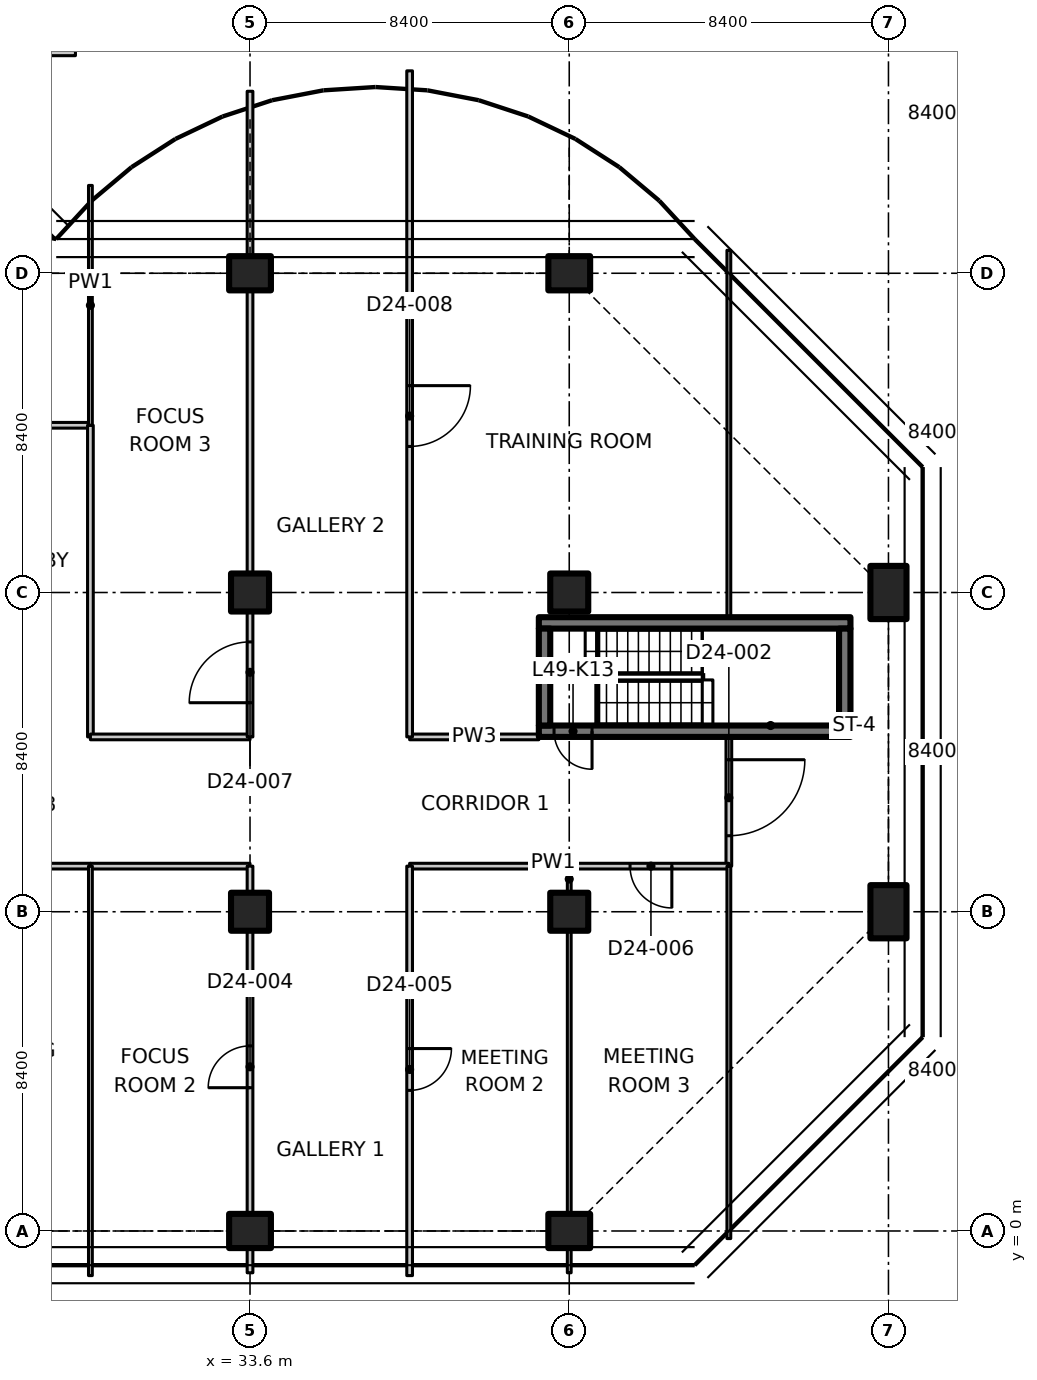
"""IFC4 building model, lengths in metres.
Left out: names, types, materials, properties, quantities, classifications, styles, units other than length and angle.
Written with IfcOpenShell. Run it as: python <this file> out.ifc"""

import sys

from ifc_helpers import new_model, si_unit, direction, frame, frame_2d, origin, origin_2d, place, context, subcontext, project, spatial, polyline, rectangle, outline, extrude, element, fill, save


model = new_model("IFC4")
c1 = context("Model", 3, precision=1e-05, world=origin(), true_north=direction((0.0, 1.0)))
c2 = subcontext(c1, "Body", "Model", "MODEL_VIEW")
j1 = project(units=[si_unit("LENGTHUNIT", "METRE"), si_unit("PLANEANGLEUNIT", "RADIAN")], contexts=[c1])
p1 = place(None, origin())
s1 = spatial("IfcSite", under=j1, at=p1, CompositionType="ELEMENT")
p2 = place(p1, origin())
s2 = spatial("IfcBuilding", under=s1, at=p2, CompositionType="ELEMENT")
p3 = place(p2, frame((0.0, 0.0, 195.6)))
s3 = spatial("IfcBuildingStorey", under=s2, at=p3, CompositionType="ELEMENT", Elevation=195.6)
p4 = place(p3, frame((33.6, 0.0, 0.0), z_axis=(0.0, 0.0, 1.0), x_axis=(0.0, 1.0, 0.0)))
e1 = element("IfcColumn", 1, at=p4, inside=s3, PredefinedType="COLUMN", context=c2, shape_type="SweptSolid", body=[
    extrude(rectangle(XDim=0.9, YDim=1.1, at=origin_2d()), origin(), (0.0, 0.0, 1.0), 3.35),
])
for number, where, z_axis, x_axis in (
    (2, (33.6, 8.4, 0.0), (0.0, 0.0, 1.0), (1.0, 0.0, 0.0)),
    (3, (33.6, 16.8, 0.0), (0.0, 0.0, 1.0), (1.0, 0.0, 0.0)),
):
    element("IfcColumn", number, at=place(p3, frame(where, z_axis=z_axis, x_axis=x_axis)), inside=s3, PredefinedType="COLUMN", context=c2, shape_type="SweptSolid", body=[
        extrude(rectangle(XDim=1.0, YDim=1.0, at=origin_2d()), origin(), (0.0, 0.0, 1.0), 3.35),
    ])
for number, where, z_axis, x_axis in (
    (4, (33.6, 25.2, 0.0), (0.0, 0.0, 1.0), (0.0, 1.0, 0.0)),
    (5, (42.0, 0.0, 0.0), (0.0, 0.0, 1.0), (0.0, 1.0, 0.0)),
):
    element("IfcColumn", number, at=place(p3, frame(where, z_axis=z_axis, x_axis=x_axis)), inside=s3, PredefinedType="COLUMN", context=c2, shape_type="SweptSolid", body=[
        extrude(rectangle(XDim=0.9, YDim=1.1, at=origin_2d()), origin(), (0.0, 0.0, 1.0), 3.35),
    ])
for number, where, z_axis, x_axis in (
    (6, (42.0, 8.4, 0.0), (0.0, 0.0, 1.0), (1.0, 0.0, 0.0)),
    (7, (42.0, 16.8, 0.0), (0.0, 0.0, 1.0), (1.0, 0.0, 0.0)),
):
    element("IfcColumn", number, at=place(p3, frame(where, z_axis=z_axis, x_axis=x_axis)), inside=s3, PredefinedType="COLUMN", context=c2, shape_type="SweptSolid", body=[
        extrude(rectangle(XDim=1.0, YDim=1.0, at=origin_2d()), origin(), (0.0, 0.0, 1.0), 3.35),
    ])
p5 = place(p3, frame((42.0, 25.2, 0.0), z_axis=(0.0, 0.0, 1.0), x_axis=(0.0, 1.0, 0.0)))
e8 = element("IfcColumn", 8, at=p5, inside=s3, PredefinedType="COLUMN", context=c2, shape_type="SweptSolid", body=[
    extrude(rectangle(XDim=0.9, YDim=1.1, at=origin_2d()), origin(), (0.0, 0.0, 1.0), 3.35),
])
for number, where, z_axis, x_axis in (
    (9, (50.4, 8.4, 0.0), (0.0, 0.0, 1.0), (1.0, 0.0, 0.0)),
    (10, (50.4, 16.8, 0.0), (0.0, 0.0, 1.0), (1.0, 0.0, 0.0)),
):
    element("IfcColumn", number, at=place(p3, frame(where, z_axis=z_axis, x_axis=x_axis)), inside=s3, PredefinedType="COLUMN", context=c2, shape_type="SweptSolid", body=[
        extrude(rectangle(XDim=0.95, YDim=1.4, at=origin_2d()), origin(), (0.0, 0.0, 1.0), 3.35),
    ])
p6 = place(p3, frame((49.4, 13.15, 0.0), z_axis=(0.0, 0.0, 1.0), x_axis=(-1.0, 0.0, 0.0)))
e11 = element("IfcWall", 11, at=p6, inside=s3, PredefinedType="SHEAR", context=c2, shape_type="SweptSolid", body=[
    extrude(rectangle(XDim=8.2, YDim=0.3, at=frame_2d((4.1, 0.0))), origin(), (0.0, 0.0, 1.0), 3.35),
])
p7 = place(p6, frame((6.8, 0.0, 0.0)))
e12 = element("IfcOpeningElement", 12, at=p7, cuts=e11, PredefinedType="OPENING", context=c2, shape_type="SweptSolid", body=[
    extrude(rectangle(XDim=1.0, YDim=2.1, at=frame_2d((0.5, 1.05))), frame((0.0, 0.16, 0.0), z_axis=(0.0, -1.0, 0.0), x_axis=(1.0, 0.0, 0.0)), (0.0, 0.0, 1.0), 0.32),
])
p8 = place(p3, frame((41.2, 16.0, 0.0), z_axis=(0.0, 0.0, 1.0), x_axis=(1.0, 0.0, 0.0)))
e13 = element("IfcWall", 13, at=p8, inside=s3, PredefinedType="SHEAR", context=c2, shape_type="SweptSolid", body=[
    extrude(rectangle(XDim=8.2, YDim=0.3, at=frame_2d((4.1, 0.0))), origin(), (0.0, 0.0, 1.0), 3.35),
])
for number, where, z_axis, x_axis in (
    (14, (41.35, 13.3, 0.0), (0.0, 0.0, 1.0), (0.0, 1.0, 0.0)),
    (15, (49.25, 13.3, 0.0), (0.0, 0.0, 1.0), (0.0, 1.0, 0.0)),
):
    element("IfcWall", number, at=place(p3, frame(where, z_axis=z_axis, x_axis=x_axis)), inside=s3, PredefinedType="SHEAR", context=c2, shape_type="SweptSolid", body=[
        extrude(rectangle(XDim=2.55, YDim=0.3, at=frame_2d((1.275, 0.0))), origin(), (0.0, 0.0, 1.0), 3.35),
    ])
p9 = place(p3, frame((25.2, 21.2, 0.0), z_axis=(0.0, 0.0, 1.0), x_axis=(1.0, 0.0, 0.0)))
e16 = element("IfcWall", 16, at=p9, inside=s3, PredefinedType="PARTITIONING", context=c2, shape_type="SweptSolid", body=[
    extrude(rectangle(XDim=4.2, YDim=0.15, at=frame_2d((2.1, 0.0))), origin(), (0.0, 0.0, 1.0), 3.33),
])
p10 = place(p3, frame((29.4, 9.6, 0.0), z_axis=(0.0, 0.0, 1.0), x_axis=(-1.0, 0.0, 0.0)))
e17 = element("IfcWall", 17, at=p10, inside=s3, PredefinedType="PARTITIONING", context=c2, shape_type="SweptSolid", body=[
    extrude(rectangle(XDim=4.2, YDim=0.15, at=frame_2d((2.1, 0.0))), origin(), (0.0, 0.0, 1.0), 3.33),
])
p11 = place(p10, frame((1.5, 0.0, 0.0)))
e18 = element("IfcOpeningElement", 18, at=p11, cuts=e17, PredefinedType="OPENING", context=c2, shape_type="SweptSolid", body=[
    extrude(rectangle(XDim=1.1, YDim=2.1, at=frame_2d((0.55, 1.05))), frame((0.0, 0.085, 0.0), z_axis=(0.0, -1.0, 0.0), x_axis=(1.0, 0.0, 0.0)), (0.0, 0.0, 1.0), 0.17),
])
p12 = place(p3, frame((29.4, 21.2, 0.0), z_axis=(0.0, 0.0, 1.0), x_axis=(0.0, -1.0, 0.0)))
e19 = element("IfcWall", 19, at=p12, inside=s3, PredefinedType="PARTITIONING", context=c2, shape_type="SweptSolid", body=[
    extrude(rectangle(XDim=8.2, YDim=0.15, at=frame_2d((4.1, 0.0))), origin(), (0.0, 0.0, 1.0), 3.33),
])
p13 = place(p3, frame((29.4, 27.511, 0.0), z_axis=(0.0, 0.0, 1.0), x_axis=(0.0, -1.0, 0.0)))
e20 = element("IfcWall", 20, at=p13, inside=s3, PredefinedType="PARTITIONING", context=c2, shape_type="SweptSolid", body=[
    extrude(outline(polyline([(0.0, 0.0), (6.311, 0.0), (6.311, 3.33), (2.761, 3.33), (2.759, 2.98), (1.863, 2.98), (1.861, 3.33), (0.236, 3.33), (0.0, 3.33), (0.0, 0.0)])), frame((0.0, 0.05, 0.0), z_axis=(0.0, -1.0, 0.0), x_axis=(1.0, 0.0, 0.0)), (0.0, 0.0, 1.0), 0.1),
])
p14 = place(p3, frame((25.2, 31.0, 0.0), z_axis=(0.0, 0.0, 1.0), x_axis=(1.0, 0.0, 0.0)))
e21 = element("IfcWall", 21, at=p14, inside=s3, PredefinedType="PARTITIONING", context=c2, shape_type="SweptSolid", body=[
    extrude(rectangle(XDim=3.806, YDim=0.15, at=frame_2d((1.903, 0.0))), origin(), (0.0, 0.0, 1.0), 2.98),
])
p15 = place(p3, frame((46.2, 13.0, 0.0), z_axis=(0.0, 0.0, 1.0), x_axis=(0.0, -1.0, 0.0)))
e22 = element("IfcWall", 22, at=p15, inside=s3, PredefinedType="PARTITIONING", context=c2, shape_type="SweptSolid", body=[
    extrude(rectangle(XDim=3.4, YDim=0.15, at=frame_2d((1.7, 0.0))), origin(), (0.0, 0.0, 1.0), 3.33),
])
p16 = place(p15, frame((0.6, 0.0, 0.0)))
e23 = element("IfcOpeningElement", 23, at=p16, cuts=e22, PredefinedType="OPENING", context=c2, shape_type="SweptSolid", body=[
    extrude(rectangle(XDim=2.0, YDim=2.4, at=frame_2d((1.0, 1.2))), frame((0.0, 0.085, 0.0), z_axis=(0.0, -1.0, 0.0), x_axis=(1.0, 0.0, 0.0)), (0.0, 0.0, 1.0), 0.17),
])
p17 = place(p3, frame((33.6, 9.6, 0.0), z_axis=(0.0, 0.0, 1.0), x_axis=(-1.0, 0.0, 0.0)))
e24 = element("IfcWall", 24, at=p17, inside=s3, PredefinedType="PARTITIONING", context=c2, shape_type="SweptSolid", body=[
    extrude(rectangle(XDim=4.2, YDim=0.15, at=frame_2d((2.1, 0.0))), origin(), (0.0, 0.0, 1.0), 3.33),
])
p18 = place(p3, frame((42.0, 9.6, 0.0), z_axis=(0.0, 0.0, 1.0), x_axis=(-1.0, 0.0, 0.0)))
e25 = element("IfcWall", 25, at=p18, inside=s3, PredefinedType="PARTITIONING", context=c2, shape_type="SweptSolid", body=[
    extrude(rectangle(XDim=4.2, YDim=0.15, at=frame_2d((2.1, 0.0))), origin(), (0.0, 0.0, 1.0), 3.33),
])
p19 = place(p3, frame((46.2, 9.6, 0.0), z_axis=(0.0, 0.0, 1.0), x_axis=(-1.0, 0.0, 0.0)))
e26 = element("IfcWall", 26, at=p19, inside=s3, PredefinedType="PARTITIONING", context=c2, shape_type="SweptSolid", body=[
    extrude(rectangle(XDim=4.2, YDim=0.15, at=frame_2d((2.1, 0.0))), origin(), (0.0, 0.0, 1.0), 3.33),
])
p20 = place(p19, frame((1.5, 0.0, 0.0)))
e27 = element("IfcOpeningElement", 27, at=p20, cuts=e26, PredefinedType="OPENING", context=c2, shape_type="SweptSolid", body=[
    extrude(rectangle(XDim=1.1, YDim=2.1, at=frame_2d((0.55, 1.05))), frame((0.0, 0.085, 0.0), z_axis=(0.0, -1.0, 0.0), x_axis=(1.0, 0.0, 0.0)), (0.0, 0.0, 1.0), 0.17),
])
p21 = place(p3, frame((29.4, 13.0, 0.0), z_axis=(0.0, 0.0, 1.0), x_axis=(1.0, 0.0, 0.0)))
e28 = element("IfcWall", 28, at=p21, inside=s3, PredefinedType="PARTITIONING", context=c2, shape_type="SweptSolid", body=[
    extrude(rectangle(XDim=4.2, YDim=0.15, at=frame_2d((2.1, 0.0))), origin(), (0.0, 0.0, 1.0), 3.33),
])
p22 = place(p3, frame((37.8, 13.0, 0.0), z_axis=(0.0, 0.0, 1.0), x_axis=(1.0, 0.0, 0.0)))
e29 = element("IfcWall", 29, at=p22, inside=s3, PredefinedType="PARTITIONING", context=c2, shape_type="SweptSolid", body=[
    extrude(rectangle(XDim=3.4, YDim=0.15, at=frame_2d((1.7, 0.0))), origin(), (0.0, 0.0, 1.0), 3.33),
])
p23 = place(p3, frame((46.2, -0.2, 0.0), z_axis=(0.0, 0.0, 1.0), x_axis=(0.0, 1.0, 0.0)))
e30 = element("IfcWall", 30, at=p23, inside=s3, PredefinedType="PARTITIONING", context=c2, shape_type="SweptSolid", body=[
    extrude(outline(polyline([(0.0, 0.0), (9.8, 0.0), (9.8, 3.33), (5.066, 3.33), (5.064, 2.98), (3.736, 2.98), (3.734, 3.33), (0.0, 3.33), (0.0, 0.0)])), frame((0.0, 0.05, 0.0), z_axis=(0.0, -1.0, 0.0), x_axis=(1.0, 0.0, 0.0)), (0.0, 0.0, 1.0), 0.1),
])
p24 = place(p3, frame((46.2, 16.15, 0.0), z_axis=(0.0, 0.0, 1.0), x_axis=(0.0, 1.0, 0.0)))
e31 = element("IfcWall", 31, at=p24, inside=s3, PredefinedType="PARTITIONING", context=c2, shape_type="SweptSolid", body=[
    extrude(outline(polyline([(0.0, 0.0), (9.656, 0.0), (9.656, 3.33), (9.25, 3.33), (5.516, 3.33), (5.514, 2.98), (4.186, 2.98), (4.184, 3.33), (0.0, 3.33), (0.0, 0.0)])), frame((0.0, 0.05, 0.0), z_axis=(0.0, -1.0, 0.0), x_axis=(1.0, 0.0, 0.0)), (0.0, 0.0, 1.0), 0.1),
])
p25 = place(p3, frame((33.6, -1.1, 0.0), z_axis=(0.0, 0.0, 1.0), x_axis=(0.0, 1.0, 0.0)))
e32 = element("IfcWall", 32, at=p25, inside=s3, PredefinedType="PARTITIONING", context=c2, shape_type="SweptSolid", body=[
    extrude(rectangle(XDim=0.63, YDim=0.15, at=frame_2d((0.315, 0.0))), origin(), (0.0, 0.0, 1.0), 3.33),
])
p26 = place(p3, frame((33.6, 0.47, 0.0), z_axis=(0.0, 0.0, 1.0), x_axis=(0.0, 1.0, 0.0)))
e33 = element("IfcWall", 33, at=p26, inside=s3, PredefinedType="PARTITIONING", context=c2, shape_type="SweptSolid", body=[
    extrude(rectangle(XDim=7.41, YDim=0.15, at=frame_2d((3.705, 0.0))), origin(), (0.0, 0.0, 1.0), 3.33),
])
p27 = place(p26, frame((3.3, 0.0, 0.0)))
e34 = element("IfcOpeningElement", 34, at=p27, cuts=e33, PredefinedType="OPENING", context=c2, shape_type="SweptSolid", body=[
    extrude(rectangle(XDim=1.1, YDim=2.1, at=frame_2d((0.55, 1.05))), frame((0.0, 0.085, 0.0), z_axis=(0.0, -1.0, 0.0), x_axis=(1.0, 0.0, 0.0)), (0.0, 0.0, 1.0), 0.17),
])
p28 = place(p3, frame((33.6, 8.92, 0.0), z_axis=(0.0, 0.0, 1.0), x_axis=(0.0, 1.0, 0.0)))
e35 = element("IfcWall", 35, at=p28, inside=s3, PredefinedType="PARTITIONING", context=c2, shape_type="SweptSolid", body=[
    extrude(rectangle(XDim=0.68, YDim=0.15, at=frame_2d((0.34, 0.0))), origin(), (0.0, 0.0, 1.0), 3.33),
])
p29 = place(p3, frame((37.8, 9.6, 0.0), z_axis=(0.0, 0.0, 1.0), x_axis=(0.0, -1.0, 0.0)))
e36 = element("IfcWall", 36, at=p29, inside=s3, PredefinedType="PARTITIONING", context=c2, shape_type="SweptSolid", body=[
    extrude(outline(polyline([(0.0, 0.0), (10.774, 0.0), (10.774, 3.33), (10.7, 3.33), (10.05, 3.33), (10.048, 2.98), (9.152, 2.98), (9.15, 3.33), (0.0, 3.33), (0.0, 0.0)])), frame((0.0, 0.075, 0.0), z_axis=(0.0, -1.0, 0.0), x_axis=(1.0, 0.0, 0.0)), (0.0, 0.0, 1.0), 0.15),
])
p30 = place(p29, frame((4.8, 0.0, 0.0)))
e37 = element("IfcOpeningElement", 37, at=p30, cuts=e36, PredefinedType="OPENING", context=c2, shape_type="SweptSolid", body=[
    extrude(rectangle(XDim=1.1, YDim=2.1, at=frame_2d((0.55, 1.05))), frame((0.0, 0.085, 0.0), z_axis=(0.0, -1.0, 0.0), x_axis=(1.0, 0.0, 0.0)), (0.0, 0.0, 1.0), 0.17),
])
p31 = place(p3, frame((29.4, 9.6, 0.0), z_axis=(0.0, 0.0, 1.0), x_axis=(0.0, -1.0, 0.0)))
e38 = element("IfcWall", 38, at=p31, inside=s3, PredefinedType="PARTITIONING", context=c2, shape_type="SweptSolid", body=[
    extrude(outline(polyline([(0.0, 0.0), (10.774, 0.0), (10.774, 3.33), (10.7, 3.33), (10.05, 3.33), (10.048, 2.98), (9.152, 2.98), (9.15, 3.33), (0.0, 3.33), (0.0, 0.0)])), frame((0.0, 0.05, 0.0), z_axis=(0.0, -1.0, 0.0), x_axis=(1.0, 0.0, 0.0)), (0.0, 0.0, 1.0), 0.1),
])
p32 = place(p3, frame((42.0, 9.6, 0.0), z_axis=(0.0, 0.0, 1.0), x_axis=(0.0, -1.0, 0.0)))
e39 = element("IfcWall", 39, at=p32, inside=s3, PredefinedType="PARTITIONING", context=c2, shape_type="SweptSolid", body=[
    extrude(rectangle(XDim=0.68, YDim=0.1, at=frame_2d((0.34, 0.0))), origin(), (0.0, 0.0, 1.0), 3.33),
])
p33 = place(p3, frame((42.0, 7.88, 0.0), z_axis=(0.0, 0.0, 1.0), x_axis=(0.0, -1.0, 0.0)))
e40 = element("IfcWall", 40, at=p33, inside=s3, PredefinedType="PARTITIONING", context=c2, shape_type="SweptSolid", body=[
    extrude(outline(polyline([(0.0, 0.0), (7.41, 0.0), (7.41, 2.98), (7.216, 2.98), (7.214, 3.33), (0.0, 3.33), (0.0, 0.0)])), frame((0.0, 0.05, 0.0), z_axis=(0.0, -1.0, 0.0), x_axis=(1.0, 0.0, 0.0)), (0.0, 0.0, 1.0), 0.1),
])
p34 = place(p3, frame((42.0, -0.47, 0.0), z_axis=(0.0, 0.0, 1.0), x_axis=(0.0, -1.0, 0.0)))
e41 = element("IfcWall", 41, at=p34, inside=s3, PredefinedType="PARTITIONING", context=c2, shape_type="SweptSolid", body=[
    extrude(rectangle(XDim=0.63, YDim=0.1, at=frame_2d((0.315, 0.0))), origin(), (0.0, 0.0, 1.0), 3.33),
])
p35 = place(p3, frame((33.6, 13.0, 0.0), z_axis=(0.0, 0.0, 1.0), x_axis=(0.0, 1.0, 0.0)))
e42 = element("IfcWall", 42, at=p35, inside=s3, PredefinedType="PARTITIONING", context=c2, shape_type="SweptSolid", body=[
    extrude(rectangle(XDim=3.28, YDim=0.15, at=frame_2d((1.64, 0.0))), origin(), (0.0, 0.0, 1.0), 3.33),
])
p36 = place(p35, frame((0.9, 0.0, 0.0)))
e43 = element("IfcOpeningElement", 43, at=p36, cuts=e42, PredefinedType="OPENING", context=c2, shape_type="SweptSolid", body=[
    extrude(rectangle(XDim=1.6, YDim=2.1, at=frame_2d((0.8, 1.05))), frame((0.0, 0.085, 0.0), z_axis=(0.0, -1.0, 0.0), x_axis=(1.0, 0.0, 0.0)), (0.0, 0.0, 1.0), 0.17),
])
p37 = place(p3, frame((33.6, 17.32, 0.0), z_axis=(0.0, 0.0, 1.0), x_axis=(0.0, 1.0, 0.0)))
e44 = element("IfcWall", 44, at=p37, inside=s3, PredefinedType="PARTITIONING", context=c2, shape_type="SweptSolid", body=[
    extrude(rectangle(XDim=7.41, YDim=0.15, at=frame_2d((3.705, 0.0))), origin(), (0.0, 0.0, 1.0), 3.33),
])
p38 = place(p3, frame((33.6, 25.67, 0.0), z_axis=(0.0, 0.0, 1.0), x_axis=(0.0, 1.0, 0.0)))
e45 = element("IfcWall", 45, at=p38, inside=s3, PredefinedType="PARTITIONING", context=c2, shape_type="SweptSolid", body=[
    extrude(rectangle(XDim=4.318, YDim=0.15, at=frame_2d((2.159, 0.0))), origin(), (0.0, 0.0, 1.0), 2.98),
])
p39 = place(p3, frame((37.8, 30.526, 0.0), z_axis=(0.0, 0.0, 1.0), x_axis=(0.0, -1.0, 0.0)))
e46 = element("IfcWall", 46, at=p39, inside=s3, PredefinedType="PARTITIONING", context=c2, shape_type="SweptSolid", body=[
    extrude(outline(polyline([(0.0, 0.0), (17.526, 0.0), (17.526, 3.33), (5.776, 3.33), (5.774, 2.98), (4.878, 2.98), (4.876, 3.33), (0.283, 3.33), (0.0, 3.33), (0.0, 0.0)])), frame((0.0, 0.075, 0.0), z_axis=(0.0, -1.0, 0.0), x_axis=(1.0, 0.0, 0.0)), (0.0, 0.0, 1.0), 0.15),
])
p40 = place(p39, frame((8.283, 0.0, 0.0)))
e47 = element("IfcOpeningElement", 47, at=p40, cuts=e46, PredefinedType="OPENING", context=c2, shape_type="SweptSolid", body=[
    extrude(rectangle(XDim=1.6, YDim=2.1, at=frame_2d((0.8, 1.05))), frame((0.0, 0.085, 0.0), z_axis=(0.0, -1.0, 0.0), x_axis=(1.0, 0.0, 0.0)), (0.0, 0.0, 1.0), 0.17),
])
p41 = place(p7, origin())
e48 = element("IfcDoor", 48, at=p41, inside=s3, OperationType="SINGLE_SWING_LEFT", PredefinedType="DOOR", context=c2, shape_type="SweptSolid", body=[
    extrude(rectangle(XDim=1.0, YDim=2.1, at=frame_2d((0.5, 1.05))), frame((0.0, 0.025, 0.0), z_axis=(0.0, -1.0, 0.0), x_axis=(1.0, 0.0, 0.0)), (0.0, 0.0, 1.0), 0.05),
])
fill(e12, e48)
p42 = place(p16, origin())
e49 = element("IfcDoor", 49, at=p42, inside=s3, OperationType="DOUBLE_DOOR_SINGLE_SWING", PredefinedType="DOOR", context=c2, shape_type="SweptSolid", body=[
    extrude(rectangle(XDim=2.0, YDim=2.4, at=frame_2d((1.0, 1.2))), frame((0.0, 0.025, 0.0), z_axis=(0.0, -1.0, 0.0), x_axis=(1.0, 0.0, 0.0)), (0.0, 0.0, 1.0), 0.05),
])
fill(e23, e49)
p43 = place(p27, origin())
e50 = element("IfcDoor", 50, at=p43, inside=s3, OperationType="SINGLE_SWING_LEFT", PredefinedType="DOOR", context=c2, shape_type="SweptSolid", body=[
    extrude(rectangle(XDim=1.1, YDim=2.1, at=frame_2d((0.55, 1.05))), frame((0.0, 0.025, 0.0), z_axis=(0.0, -1.0, 0.0), x_axis=(1.0, 0.0, 0.0)), (0.0, 0.0, 1.0), 0.05),
])
fill(e34, e50)
p44 = place(p30, origin())
e51 = element("IfcDoor", 51, at=p44, inside=s3, OperationType="SINGLE_SWING_LEFT", PredefinedType="DOOR", context=c2, shape_type="SweptSolid", body=[
    extrude(rectangle(XDim=1.1, YDim=2.1, at=frame_2d((0.55, 1.05))), frame((0.0, 0.025, 0.0), z_axis=(0.0, -1.0, 0.0), x_axis=(1.0, 0.0, 0.0)), (0.0, 0.0, 1.0), 0.05),
])
fill(e37, e51)
p45 = place(p20, origin())
e52 = element("IfcDoor", 52, at=p45, inside=s3, OperationType="SINGLE_SWING_LEFT", PredefinedType="DOOR", context=c2, shape_type="SweptSolid", body=[
    extrude(rectangle(XDim=1.1, YDim=2.1, at=frame_2d((0.55, 1.05))), frame((0.0, 0.025, 0.0), z_axis=(0.0, -1.0, 0.0), x_axis=(1.0, 0.0, 0.0)), (0.0, 0.0, 1.0), 0.05),
])
fill(e27, e52)
p46 = place(p36, origin())
e53 = element("IfcDoor", 53, at=p46, inside=s3, OperationType="DOUBLE_DOOR_SINGLE_SWING", PredefinedType="DOOR", context=c2, shape_type="SweptSolid", body=[
    extrude(rectangle(XDim=1.6, YDim=2.1, at=frame_2d((0.8, 1.05))), frame((0.0, 0.025, 0.0), z_axis=(0.0, -1.0, 0.0), x_axis=(1.0, 0.0, 0.0)), (0.0, 0.0, 1.0), 0.05),
])
fill(e43, e53)
p47 = place(p40, origin())
e54 = element("IfcDoor", 54, at=p47, inside=s3, OperationType="DOUBLE_DOOR_SINGLE_SWING", PredefinedType="DOOR", context=c2, shape_type="SweptSolid", body=[
    extrude(rectangle(XDim=1.6, YDim=2.1, at=frame_2d((0.8, 1.05))), frame((0.0, 0.025, 0.0), z_axis=(0.0, -1.0, 0.0), x_axis=(1.0, 0.0, 0.0)), (0.0, 0.0, 1.0), 0.05),
])
fill(e47, e54)
save(model, sys.argv[1])
